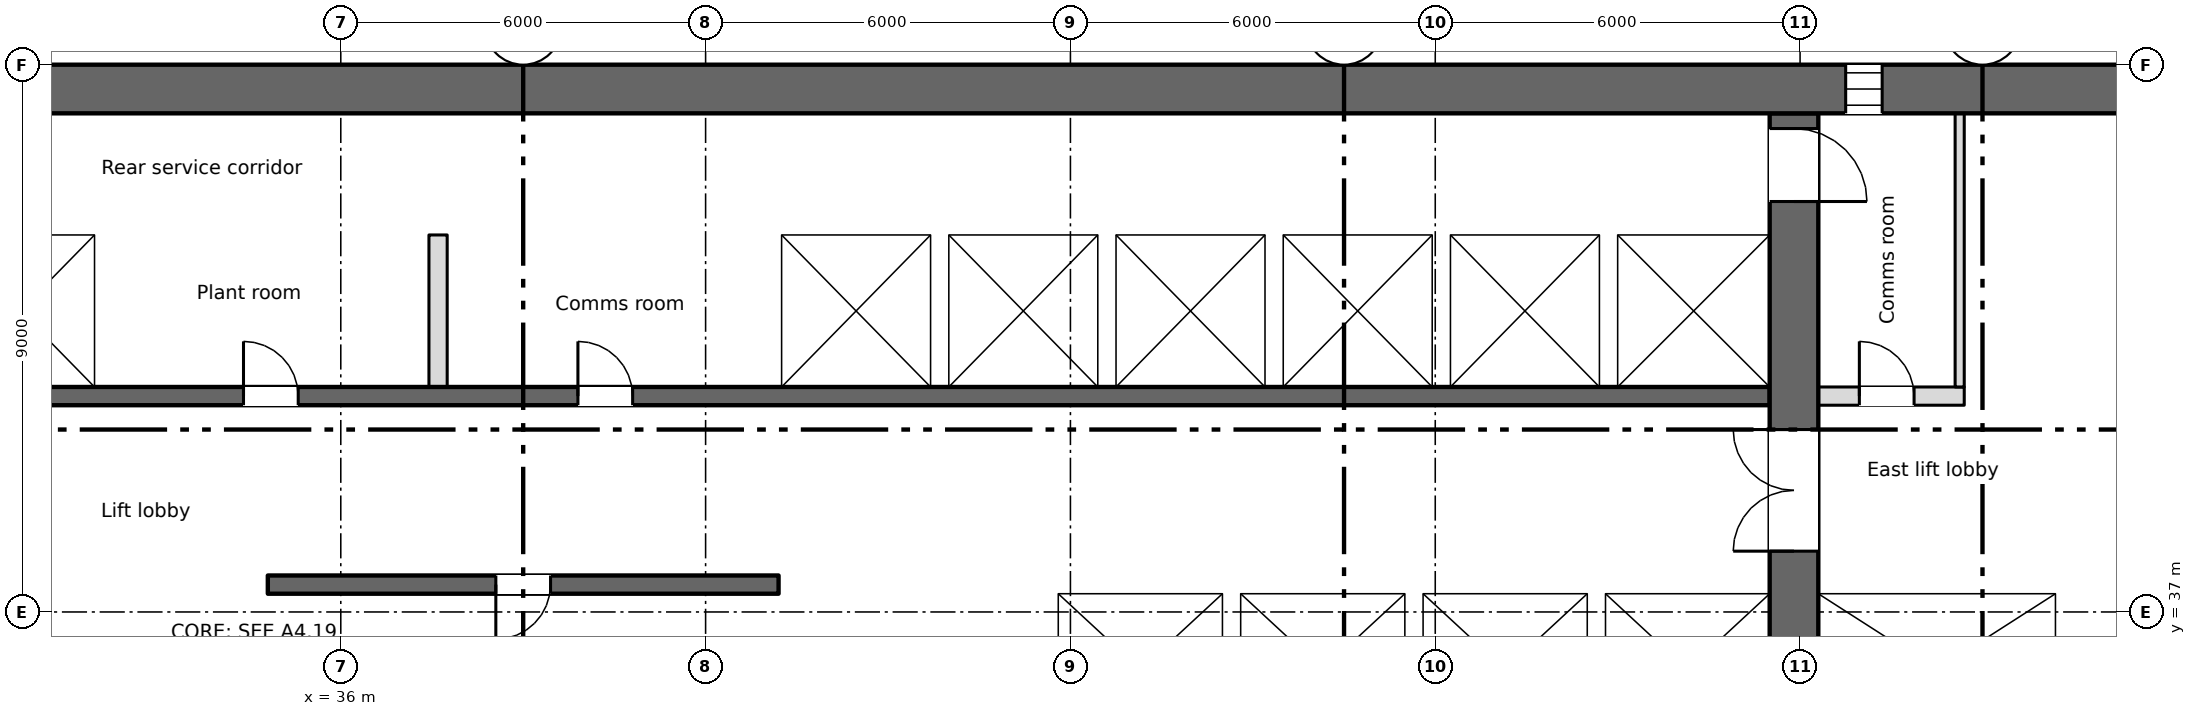
"""IFC4 building model, lengths in metres.
Left out: names, types, materials, properties, quantities, classifications, styles, units other than length and angle.
Written with IfcOpenShell. Run it as: python <this file> out.ifc"""

import sys

from ifc_helpers import new_model, si_unit, direction, frame, frame_2d, origin, place, context, subcontext, project, spatial, rectangle, extrude, element, fill, save


model = new_model("IFC4")
c1 = context("Model", 3, precision=1e-05, world=origin(), true_north=direction((0.0, 1.0)))
c2 = subcontext(c1, "Body", "Model", "MODEL_VIEW")
j1 = project(units=[si_unit("LENGTHUNIT", "METRE"), si_unit("PLANEANGLEUNIT", "RADIAN")], contexts=[c1])
p1 = place(None, origin())
s1 = spatial("IfcSite", under=j1, at=p1, CompositionType="ELEMENT")
p2 = place(p1, origin())
s2 = spatial("IfcBuilding", under=s1, at=p2, CompositionType="ELEMENT")
p3 = place(p2, frame((0.0, 0.0, 136.25)))
s3 = spatial("IfcBuildingStorey", under=s2, at=p3, CompositionType="ELEMENT", Elevation=136.25)
p4 = place(p3, frame((5.55, 45.6, 0.0), z_axis=(0.0, 0.0, 1.0), x_axis=(1.0, 0.0, 0.0)))
e1 = element("IfcWall", 1, at=p4, inside=s3, PredefinedType="SHEAR", context=c2, shape_type="SweptSolid", body=[
    extrude(rectangle(XDim=60.9, YDim=0.8, at=frame_2d((30.45, 0.0))), origin(), (0.0, 0.0, 1.0), 3.35),
])
p5 = place(p4, frame((1.2, 0.0, 0.6)))
e2 = element("IfcOpeningElement", 2, at=p5, cuts=e1, PredefinedType="OPENING", context=c2, shape_type="SweptSolid", body=[
    extrude(rectangle(XDim=0.6, YDim=2.4, at=frame_2d((0.3, 1.2))), frame((0.0, 0.41, 0.0), z_axis=(0.0, -1.0, 0.0), x_axis=(1.0, 0.0, 0.0)), (0.0, 0.0, 1.0), 0.82),
])
p6 = place(p4, frame((7.2, 0.0, 0.6)))
e3 = element("IfcOpeningElement", 3, at=p6, cuts=e1, PredefinedType="OPENING", context=c2, shape_type="SweptSolid", body=[
    extrude(rectangle(XDim=0.6, YDim=2.4, at=frame_2d((0.3, 1.2))), frame((0.0, 0.41, 0.0), z_axis=(0.0, -1.0, 0.0), x_axis=(1.0, 0.0, 0.0)), (0.0, 0.0, 1.0), 0.82),
])
p7 = place(p4, frame((55.2, 0.0, 0.6)))
e4 = element("IfcOpeningElement", 4, at=p7, cuts=e1, PredefinedType="OPENING", context=c2, shape_type="SweptSolid", body=[
    extrude(rectangle(XDim=0.6, YDim=2.4, at=frame_2d((0.3, 1.2))), frame((0.0, 0.41, 0.0), z_axis=(0.0, -1.0, 0.0), x_axis=(1.0, 0.0, 0.0)), (0.0, 0.0, 1.0), 0.82),
])
p8 = place(p3, frame((64.35, 34.8, 0.0), z_axis=(0.0, 0.0, 1.0), x_axis=(0.0, 1.0, 0.0)))
e5 = element("IfcWall", 5, at=p8, inside=s3, PredefinedType="SHEAR", context=c2, shape_type="SweptSolid", body=[
    extrude(rectangle(XDim=10.4, YDim=0.3, at=frame_2d((5.2, 0.0))), origin(), (0.0, 0.0, 1.0), 3.35),
])
p9 = place(p3, frame((59.9, 28.4, 0.0), z_axis=(0.0, 0.0, 1.0), x_axis=(0.0, 1.0, 0.0)))
e6 = element("IfcWall", 6, at=p9, inside=s3, PredefinedType="SHEAR", context=c2, shape_type="SweptSolid", body=[
    extrude(rectangle(XDim=16.8, YDim=0.8, at=frame_2d((8.4, 0.0))), origin(), (0.0, 0.0, 1.0), 3.35),
])
p10 = place(p9, frame((9.6, 0.0, 0.0)))
e7 = element("IfcOpeningElement", 7, at=p10, cuts=e6, PredefinedType="OPENING", context=c2, shape_type="SweptSolid", body=[
    extrude(rectangle(XDim=2.0, YDim=2.1, at=frame_2d((1.0, 1.05))), frame((0.0, 0.41, 0.0), z_axis=(0.0, -1.0, 0.0), x_axis=(1.0, 0.0, 0.0)), (0.0, 0.0, 1.0), 0.82),
])
p11 = place(p9, frame((15.35, 0.0, 0.0)))
e8 = element("IfcOpeningElement", 8, at=p11, cuts=e6, PredefinedType="OPENING", context=c2, shape_type="SweptSolid", body=[
    extrude(rectangle(XDim=1.2, YDim=2.1, at=frame_2d((0.6, 1.05))), frame((0.0, 0.41, 0.0), z_axis=(0.0, -1.0, 0.0), x_axis=(1.0, 0.0, 0.0)), (0.0, 0.0, 1.0), 0.82),
])
p12 = place(p3, frame((43.2, 37.45, 0.0), z_axis=(0.0, 0.0, 1.0), x_axis=(-1.0, 0.0, 0.0)))
e9 = element("IfcWall", 9, at=p12, inside=s3, PredefinedType="SHEAR", context=c2, shape_type="SweptSolid", body=[
    extrude(rectangle(XDim=8.4, YDim=0.3, at=frame_2d((4.2, 0.0))), origin(), (0.0, 0.0, 1.0), 3.35),
])
p13 = place(p12, frame((3.75, 0.0, 0.0)))
e10 = element("IfcOpeningElement", 10, at=p13, cuts=e9, PredefinedType="OPENING", context=c2, shape_type="SweptSolid", body=[
    extrude(rectangle(XDim=0.9, YDim=2.1, at=frame_2d((0.45, 1.05))), frame((0.0, 0.16, 0.0), z_axis=(0.0, -1.0, 0.0), x_axis=(1.0, 0.0, 0.0)), (0.0, 0.0, 1.0), 0.32),
])
p14 = place(p3, frame((47.3, 37.45, 0.0), z_axis=(0.0, 0.0, 1.0), x_axis=(1.0, 0.0, 0.0)))
e11 = element("IfcWall", 11, at=p14, inside=s3, PredefinedType="SHEAR", context=c2, shape_type="SweptSolid", body=[
    extrude(rectangle(XDim=12.2, YDim=0.3, at=frame_2d((6.1, 0.0))), origin(), (0.0, 0.0, 1.0), 3.35),
])
p15 = place(p14, frame((4.3, 0.0, 0.0)))
e12 = element("IfcOpeningElement", 12, at=p15, cuts=e11, PredefinedType="OPENING", context=c2, shape_type="SweptSolid", body=[
    extrude(rectangle(XDim=1.1, YDim=2.1, at=frame_2d((0.55, 1.05))), frame((0.0, 0.16, 0.0), z_axis=(0.0, -1.0, 0.0), x_axis=(1.0, 0.0, 0.0)), (0.0, 0.0, 1.0), 0.32),
])
p16 = place(p14, frame((7.3, 0.0, 0.0)))
e13 = element("IfcOpeningElement", 13, at=p16, cuts=e11, PredefinedType="OPENING", context=c2, shape_type="SweptSolid", body=[
    extrude(rectangle(XDim=1.1, YDim=2.1, at=frame_2d((0.55, 1.05))), frame((0.0, 0.16, 0.0), z_axis=(0.0, -1.0, 0.0), x_axis=(1.0, 0.0, 0.0)), (0.0, 0.0, 1.0), 0.32),
])
p17 = place(p14, frame((10.3, 0.0, 0.0)))
e14 = element("IfcOpeningElement", 14, at=p17, cuts=e11, PredefinedType="OPENING", context=c2, shape_type="SweptSolid", body=[
    extrude(rectangle(XDim=1.1, YDim=2.1, at=frame_2d((0.55, 1.05))), frame((0.0, 0.16, 0.0), z_axis=(0.0, -1.0, 0.0), x_axis=(1.0, 0.0, 0.0)), (0.0, 0.0, 1.0), 0.32),
])
p18 = place(p3, frame((60.3, 37.45, 0.0), z_axis=(0.0, 0.0, 1.0), x_axis=(1.0, 0.0, 0.0)))
e15 = element("IfcWall", 15, at=p18, inside=s3, PredefinedType="SHEAR", context=c2, shape_type="SweptSolid", body=[
    extrude(rectangle(XDim=3.9, YDim=0.3, at=frame_2d((1.95, 0.0))), origin(), (0.0, 0.0, 1.0), 3.35),
])
p19 = place(p18, frame((1.4, 0.0, 0.0)))
e16 = element("IfcOpeningElement", 16, at=p19, cuts=e15, PredefinedType="OPENING", context=c2, shape_type="SweptSolid", body=[
    extrude(rectangle(XDim=1.1, YDim=2.1, at=frame_2d((0.55, 1.05))), frame((0.0, 0.16, 0.0), z_axis=(0.0, -1.0, 0.0), x_axis=(1.0, 0.0, 0.0)), (0.0, 0.0, 1.0), 0.32),
])
for number, where, z_axis, x_axis in (
    (17, (34.95, 34.8, 0.0), (0.0, 0.0, 1.0), (0.0, 1.0, 0.0)),
    (18, (43.05, 34.8, 0.0), (0.0, 0.0, 1.0), (0.0, 1.0, 0.0)),
):
    element("IfcWall", number, at=place(p3, frame(where, z_axis=z_axis, x_axis=x_axis)), inside=s3, PredefinedType="SHEAR", context=c2, shape_type="SweptSolid", body=[
        extrude(rectangle(XDim=2.5, YDim=0.3, at=frame_2d((1.25, 0.0))), origin(), (0.0, 0.0, 1.0), 3.35),
    ])
p20 = place(p3, frame((47.55, 34.8, 0.0), z_axis=(0.0, 0.0, 1.0), x_axis=(0.0, 1.0, 0.0)))
e19 = element("IfcWall", 19, at=p20, inside=s3, PredefinedType="SHEAR", context=c2, shape_type="SweptSolid", body=[
    extrude(rectangle(XDim=2.5, YDim=0.5, at=frame_2d((1.25, 0.0))), origin(), (0.0, 0.0, 1.0), 3.35),
])
p21 = place(p3, frame((50.65, 34.8, 0.0), z_axis=(0.0, 0.0, 1.0), x_axis=(0.0, 1.0, 0.0)))
e20 = element("IfcWall", 20, at=p21, inside=s3, PredefinedType="SHEAR", context=c2, shape_type="SweptSolid", body=[
    extrude(rectangle(XDim=2.5, YDim=0.3, at=frame_2d((1.25, 0.0))), origin(), (0.0, 0.0, 1.0), 3.35),
])
p22 = place(p3, frame((18.5, 40.55, 0.0), z_axis=(0.0, 0.0, 1.0), x_axis=(1.0, 0.0, 0.0)))
e21 = element("IfcWall", 21, at=p22, inside=s3, PredefinedType="SHEAR", context=c2, shape_type="SweptSolid", body=[
    extrude(rectangle(XDim=41.0, YDim=0.3, at=frame_2d((20.5, 0.0))), origin(), (0.0, 0.0, 1.0), 3.35),
])
p23 = place(p22, frame((15.9, 0.0, 0.0)))
e22 = element("IfcOpeningElement", 22, at=p23, cuts=e21, PredefinedType="OPENING", context=c2, shape_type="SweptSolid", body=[
    extrude(rectangle(XDim=0.9, YDim=2.1, at=frame_2d((0.45, 1.05))), frame((0.0, 0.16, 0.0), z_axis=(0.0, -1.0, 0.0), x_axis=(1.0, 0.0, 0.0)), (0.0, 0.0, 1.0), 0.32),
])
p24 = place(p22, frame((21.4, 0.0, 0.0)))
e23 = element("IfcOpeningElement", 23, at=p24, cuts=e21, PredefinedType="OPENING", context=c2, shape_type="SweptSolid", body=[
    extrude(rectangle(XDim=0.9, YDim=2.1, at=frame_2d((0.45, 1.05))), frame((0.0, 0.16, 0.0), z_axis=(0.0, -1.0, 0.0), x_axis=(1.0, 0.0, 0.0)), (0.0, 0.0, 1.0), 0.32),
])
p25 = place(p22, frame((6.175, 0.0, 0.0)))
e24 = element("IfcOpeningElement", 24, at=p25, cuts=e21, PredefinedType="OPENING", context=c2, shape_type="SweptSolid", body=[
    extrude(rectangle(XDim=1.1, YDim=2.1, at=frame_2d((0.55, 1.05))), frame((0.0, 0.16, 0.0), z_axis=(0.0, -1.0, 0.0), x_axis=(1.0, 0.0, 0.0)), (0.0, 0.0, 1.0), 0.32),
])
p26 = place(p22, frame((8.925, 0.0, 0.0)))
e25 = element("IfcOpeningElement", 25, at=p26, cuts=e21, PredefinedType="OPENING", context=c2, shape_type="SweptSolid", body=[
    extrude(rectangle(XDim=1.1, YDim=2.1, at=frame_2d((0.55, 1.05))), frame((0.0, 0.16, 0.0), z_axis=(0.0, -1.0, 0.0), x_axis=(1.0, 0.0, 0.0)), (0.0, 0.0, 1.0), 0.32),
])
p27 = place(p22, frame((11.675, 0.0, 0.0)))
e26 = element("IfcOpeningElement", 26, at=p27, cuts=e21, PredefinedType="OPENING", context=c2, shape_type="SweptSolid", body=[
    extrude(rectangle(XDim=1.1, YDim=2.1, at=frame_2d((0.55, 1.05))), frame((0.0, 0.16, 0.0), z_axis=(0.0, -1.0, 0.0), x_axis=(1.0, 0.0, 0.0)), (0.0, 0.0, 1.0), 0.32),
])
p28 = place(p22, frame((30.925, 0.0, 0.0)))
e27 = element("IfcOpeningElement", 27, at=p28, cuts=e21, PredefinedType="OPENING", context=c2, shape_type="SweptSolid", body=[
    extrude(rectangle(XDim=1.1, YDim=2.1, at=frame_2d((0.55, 1.05))), frame((0.0, 0.16, 0.0), z_axis=(0.0, -1.0, 0.0), x_axis=(1.0, 0.0, 0.0)), (0.0, 0.0, 1.0), 0.32),
])
p29 = place(p22, frame((33.675, 0.0, 0.0)))
e28 = element("IfcOpeningElement", 28, at=p29, cuts=e21, PredefinedType="OPENING", context=c2, shape_type="SweptSolid", body=[
    extrude(rectangle(XDim=1.1, YDim=2.1, at=frame_2d((0.55, 1.05))), frame((0.0, 0.16, 0.0), z_axis=(0.0, -1.0, 0.0), x_axis=(1.0, 0.0, 0.0)), (0.0, 0.0, 1.0), 0.32),
])
p30 = place(p22, frame((36.375, 0.0, 0.0)))
e29 = element("IfcOpeningElement", 29, at=p30, cuts=e21, PredefinedType="OPENING", context=c2, shape_type="SweptSolid", body=[
    extrude(rectangle(XDim=1.2, YDim=2.1, at=frame_2d((0.6, 1.05))), frame((0.0, 0.16, 0.0), z_axis=(0.0, -1.0, 0.0), x_axis=(1.0, 0.0, 0.0)), (0.0, 0.0, 1.0), 0.32),
])
p31 = place(p22, frame((39.15, 0.0, 0.0)))
e30 = element("IfcOpeningElement", 30, at=p31, cuts=e21, PredefinedType="OPENING", context=c2, shape_type="SweptSolid", body=[
    extrude(rectangle(XDim=1.2, YDim=2.1, at=frame_2d((0.6, 1.05))), frame((0.0, 0.16, 0.0), z_axis=(0.0, -1.0, 0.0), x_axis=(1.0, 0.0, 0.0)), (0.0, 0.0, 1.0), 0.32),
])
p32 = place(p3, frame((18.5, 43.35, 0.0), z_axis=(0.0, 0.0, 1.0), x_axis=(1.0, 0.0, 0.0)))
e31 = element("IfcWall", 31, at=p32, inside=s3, PredefinedType="SHEAR", context=c2, shape_type="SweptSolid", body=[
    extrude(rectangle(XDim=41.0, YDim=0.3, at=frame_2d((20.5, 0.0))), origin(), (0.0, 0.0, 1.0), 3.35),
])
p33 = place(p3, frame((60.3, 40.55, 0.0), z_axis=(0.0, 0.0, 1.0), x_axis=(1.0, 0.0, 0.0)))
e32 = element("IfcWall", 32, at=p33, inside=s3, PredefinedType="PARTITIONING", context=c2, shape_type="SweptSolid", body=[
    extrude(rectangle(XDim=2.4, YDim=0.3, at=frame_2d((1.2, 0.0))), origin(), (0.0, 0.0, 1.0), 3.35),
])
p34 = place(p33, frame((0.675, 0.0, 0.0)))
e33 = element("IfcOpeningElement", 33, at=p34, cuts=e32, PredefinedType="OPENING", context=c2, shape_type="SweptSolid", body=[
    extrude(rectangle(XDim=0.9, YDim=2.1, at=frame_2d((0.45, 1.05))), frame((0.0, 0.16, 0.0), z_axis=(0.0, -1.0, 0.0), x_axis=(1.0, 0.0, 0.0)), (0.0, 0.0, 1.0), 0.32),
])
for number, where, z_axis, x_axis in (
    (34, (53.65, 34.8, 0.0), (0.0, 0.0, 1.0), (0.0, 1.0, 0.0)),
    (35, (56.65, 34.8, 0.0), (0.0, 0.0, 1.0), (0.0, 1.0, 0.0)),
    (36, (32.1, 40.7, 0.0), (0.0, 0.0, 1.0), (0.0, 1.0, 0.0)),
    (37, (43.1, 40.7, 0.0), (0.0, 0.0, 1.0), (0.0, 1.0, 0.0)),
    (38, (45.85, 40.7, 0.0), (0.0, 0.0, 1.0), (0.0, 1.0, 0.0)),
    (39, (48.6, 40.7, 0.0), (0.0, 0.0, 1.0), (0.0, 1.0, 0.0)),
    (40, (51.35, 40.7, 0.0), (0.0, 0.0, 1.0), (0.0, 1.0, 0.0)),
    (41, (54.1, 40.7, 0.0), (0.0, 0.0, 1.0), (0.0, 1.0, 0.0)),
    (42, (56.85, 40.7, 0.0), (0.0, 0.0, 1.0), (0.0, 1.0, 0.0)),
):
    element("IfcWall", number, at=place(p3, frame(where, z_axis=z_axis, x_axis=x_axis)), inside=s3, PredefinedType="SHEAR", context=c2, shape_type="SweptSolid", body=[
        extrude(rectangle(XDim=2.5, YDim=0.3, at=frame_2d((1.25, 0.0))), origin(), (0.0, 0.0, 1.0), 3.35),
    ])
p35 = place(p3, frame((62.625, 40.7, 0.0), z_axis=(0.0, 0.0, 1.0), x_axis=(0.0, 1.0, 0.0)))
e43 = element("IfcWall", 43, at=p35, inside=s3, PredefinedType="PARTITIONING", context=c2, shape_type="SweptSolid", body=[
    extrude(rectangle(XDim=4.5, YDim=0.15, at=frame_2d((2.25, 0.0))), origin(), (0.0, 0.0, 1.0), 3.35),
])
p36 = place(p3, frame((37.6, 40.7, 0.0), z_axis=(0.0, 0.0, 1.0), x_axis=(0.0, 1.0, 0.0)))
e44 = element("IfcWall", 44, at=p36, inside=s3, PredefinedType="PARTITIONING", context=c2, shape_type="SweptSolid", body=[
    extrude(rectangle(XDim=2.5, YDim=0.3, at=frame_2d((1.25, 0.0))), origin(), (0.0, 0.0, 1.0), 3.35),
])
p37 = place(p7, origin())
e45 = element("IfcWindow", 45, at=p37, inside=s3, PartitioningType="SINGLE_PANEL", PredefinedType="WINDOW", context=c2, shape_type="SweptSolid", body=[
    extrude(rectangle(XDim=0.6, YDim=2.4, at=frame_2d((0.3, 1.2))), frame((0.0, 0.03, 0.0), z_axis=(0.0, -1.0, 0.0), x_axis=(1.0, 0.0, 0.0)), (0.0, 0.0, 1.0), 0.06),
])
fill(e4, e45)
p38 = place(p34, origin())
e46 = element("IfcDoor", 46, at=p38, inside=s3, OperationType="SINGLE_SWING_LEFT", PredefinedType="DOOR", context=c2, shape_type="SweptSolid", body=[
    extrude(rectangle(XDim=0.9, YDim=2.1, at=frame_2d((0.45, 1.05))), frame((0.0, 0.025, 0.0), z_axis=(0.0, -1.0, 0.0), x_axis=(1.0, 0.0, 0.0)), (0.0, 0.0, 1.0), 0.05),
])
fill(e33, e46)
p39 = place(p13, origin())
e47 = element("IfcDoor", 47, at=p39, inside=s3, OperationType="SINGLE_SWING_RIGHT", PredefinedType="DOOR", context=c2, shape_type="SweptSolid", body=[
    extrude(rectangle(XDim=0.9, YDim=2.1, at=frame_2d((0.45, 1.05))), frame((0.0, 0.025, 0.0), z_axis=(0.0, -1.0, 0.0), x_axis=(1.0, 0.0, 0.0)), (0.0, 0.0, 1.0), 0.05),
])
fill(e10, e47)
p40 = place(p23, origin())
e48 = element("IfcDoor", 48, at=p40, inside=s3, OperationType="SINGLE_SWING_LEFT", PredefinedType="DOOR", context=c2, shape_type="SweptSolid", body=[
    extrude(rectangle(XDim=0.9, YDim=2.1, at=frame_2d((0.45, 1.05))), frame((0.0, 0.025, 0.0), z_axis=(0.0, -1.0, 0.0), x_axis=(1.0, 0.0, 0.0)), (0.0, 0.0, 1.0), 0.05),
])
fill(e22, e48)
p41 = place(p24, origin())
e49 = element("IfcDoor", 49, at=p41, inside=s3, OperationType="SINGLE_SWING_LEFT", PredefinedType="DOOR", context=c2, shape_type="SweptSolid", body=[
    extrude(rectangle(XDim=0.9, YDim=2.1, at=frame_2d((0.45, 1.05))), frame((0.0, 0.025, 0.0), z_axis=(0.0, -1.0, 0.0), x_axis=(1.0, 0.0, 0.0)), (0.0, 0.0, 1.0), 0.05),
])
fill(e23, e49)
p42 = place(p15, origin())
e50 = element("IfcDoor", 50, at=p42, inside=s3, OperationType="SLIDING_TO_LEFT", PredefinedType="DOOR", context=c2, shape_type="SweptSolid", body=[
    extrude(rectangle(XDim=1.1, YDim=2.1, at=frame_2d((0.55, 1.05))), frame((0.0, 0.025, 0.0), z_axis=(0.0, -1.0, 0.0), x_axis=(1.0, 0.0, 0.0)), (0.0, 0.0, 1.0), 0.05),
])
fill(e12, e50)
p43 = place(p16, origin())
e51 = element("IfcDoor", 51, at=p43, inside=s3, OperationType="SLIDING_TO_LEFT", PredefinedType="DOOR", context=c2, shape_type="SweptSolid", body=[
    extrude(rectangle(XDim=1.1, YDim=2.1, at=frame_2d((0.55, 1.05))), frame((0.0, 0.025, 0.0), z_axis=(0.0, -1.0, 0.0), x_axis=(1.0, 0.0, 0.0)), (0.0, 0.0, 1.0), 0.05),
])
fill(e13, e51)
p44 = place(p17, origin())
e52 = element("IfcDoor", 52, at=p44, inside=s3, OperationType="SLIDING_TO_LEFT", PredefinedType="DOOR", context=c2, shape_type="SweptSolid", body=[
    extrude(rectangle(XDim=1.1, YDim=2.1, at=frame_2d((0.55, 1.05))), frame((0.0, 0.025, 0.0), z_axis=(0.0, -1.0, 0.0), x_axis=(1.0, 0.0, 0.0)), (0.0, 0.0, 1.0), 0.05),
])
fill(e14, e52)
p45 = place(p27, origin())
e53 = element("IfcDoor", 53, at=p45, inside=s3, OperationType="SLIDING_TO_LEFT", PredefinedType="DOOR", context=c2, shape_type="SweptSolid", body=[
    extrude(rectangle(XDim=1.1, YDim=2.1, at=frame_2d((0.55, 1.05))), frame((0.0, 0.025, 0.0), z_axis=(0.0, -1.0, 0.0), x_axis=(1.0, 0.0, 0.0)), (0.0, 0.0, 1.0), 0.05),
])
fill(e26, e53)
p46 = place(p28, origin())
e54 = element("IfcDoor", 54, at=p46, inside=s3, OperationType="SLIDING_TO_LEFT", PredefinedType="DOOR", context=c2, shape_type="SweptSolid", body=[
    extrude(rectangle(XDim=1.1, YDim=2.1, at=frame_2d((0.55, 1.05))), frame((0.0, 0.025, 0.0), z_axis=(0.0, -1.0, 0.0), x_axis=(1.0, 0.0, 0.0)), (0.0, 0.0, 1.0), 0.05),
])
fill(e27, e54)
p47 = place(p29, origin())
e55 = element("IfcDoor", 55, at=p47, inside=s3, OperationType="SLIDING_TO_LEFT", PredefinedType="DOOR", context=c2, shape_type="SweptSolid", body=[
    extrude(rectangle(XDim=1.1, YDim=2.1, at=frame_2d((0.55, 1.05))), frame((0.0, 0.025, 0.0), z_axis=(0.0, -1.0, 0.0), x_axis=(1.0, 0.0, 0.0)), (0.0, 0.0, 1.0), 0.05),
])
fill(e28, e55)
p48 = place(p30, origin())
e56 = element("IfcDoor", 56, at=p48, inside=s3, OperationType="SLIDING_TO_LEFT", PredefinedType="DOOR", context=c2, shape_type="SweptSolid", body=[
    extrude(rectangle(XDim=1.2, YDim=2.1, at=frame_2d((0.6, 1.05))), frame((0.0, 0.025, 0.0), z_axis=(0.0, -1.0, 0.0), x_axis=(1.0, 0.0, 0.0)), (0.0, 0.0, 1.0), 0.05),
])
fill(e29, e56)
p49 = place(p31, origin())
e57 = element("IfcDoor", 57, at=p49, inside=s3, OperationType="SLIDING_TO_LEFT", PredefinedType="DOOR", context=c2, shape_type="SweptSolid", body=[
    extrude(rectangle(XDim=1.2, YDim=2.1, at=frame_2d((0.6, 1.05))), frame((0.0, 0.025, 0.0), z_axis=(0.0, -1.0, 0.0), x_axis=(1.0, 0.0, 0.0)), (0.0, 0.0, 1.0), 0.05),
])
fill(e30, e57)
p50 = place(p19, origin())
e58 = element("IfcDoor", 58, at=p50, inside=s3, OperationType="SLIDING_TO_LEFT", PredefinedType="DOOR", context=c2, shape_type="SweptSolid", body=[
    extrude(rectangle(XDim=1.1, YDim=2.1, at=frame_2d((0.55, 1.05))), frame((0.0, 0.025, 0.0), z_axis=(0.0, -1.0, 0.0), x_axis=(1.0, 0.0, 0.0)), (0.0, 0.0, 1.0), 0.05),
])
fill(e16, e58)
p51 = place(p10, origin())
e59 = element("IfcDoor", 59, at=p51, inside=s3, OperationType="DOUBLE_DOOR_SINGLE_SWING", PredefinedType="DOOR", context=c2, shape_type="SweptSolid", body=[
    extrude(rectangle(XDim=2.0, YDim=2.1, at=frame_2d((1.0, 1.05))), frame((0.0, 0.025, 0.0), z_axis=(0.0, -1.0, 0.0), x_axis=(1.0, 0.0, 0.0)), (0.0, 0.0, 1.0), 0.05),
])
fill(e7, e59)
p52 = place(p11, origin())
e60 = element("IfcDoor", 60, at=p52, inside=s3, OperationType="SINGLE_SWING_LEFT", PredefinedType="DOOR", context=c2, shape_type="SweptSolid", body=[
    extrude(rectangle(XDim=1.2, YDim=2.1, at=frame_2d((0.6, 1.05))), frame((0.0, 0.025, 0.0), z_axis=(0.0, -1.0, 0.0), x_axis=(1.0, 0.0, 0.0)), (0.0, 0.0, 1.0), 0.05),
])
fill(e8, e60)
save(model, sys.argv[1])
